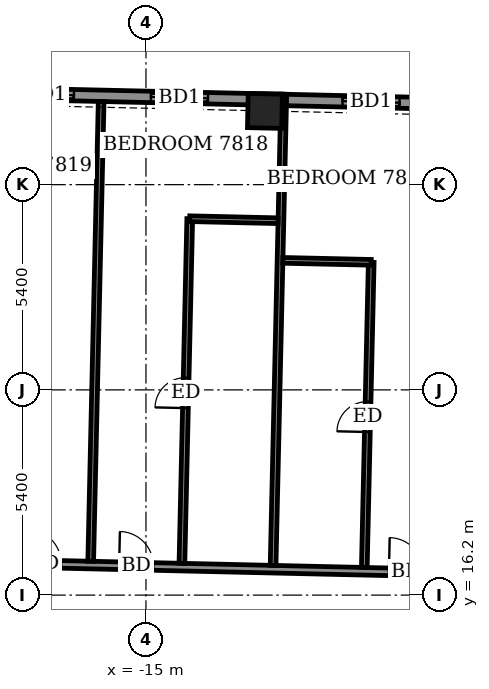
"""IFC4 building model, lengths in metres.
Left out: names, types, materials, properties, quantities, classifications, styles, units other than length and angle.
Written with IfcOpenShell. Run it as: python <this file> out.ifc"""

import sys

from ifc_helpers import new_model, si_unit, direction, frame, frame_2d, origin, origin_2d, place, context, subcontext, project, spatial, rectangle, extrude, element, fill, save


model = new_model("IFC4")
c1 = context("Model", 3, precision=1e-05, world=origin(), true_north=direction((0.0, 1.0)))
c2 = subcontext(c1, "Body", "Model", "MODEL_VIEW")
j1 = project(units=[si_unit("LENGTHUNIT", "METRE"), si_unit("PLANEANGLEUNIT", "RADIAN")], contexts=[c1])
p1 = place(None, origin())
s1 = spatial("IfcSite", under=j1, at=p1, CompositionType="ELEMENT")
p2 = place(p1, origin())
s2 = spatial("IfcBuilding", under=s1, at=p2, CompositionType="ELEMENT")
p3 = place(p2, frame((0.0, 0.0, 306.1)))
s3 = spatial("IfcBuildingStorey", under=s2, at=p3, CompositionType="ELEMENT", Elevation=306.1)
p4 = place(p3, frame((-11.869, 28.94, -0.55), z_axis=(0.0, 0.0, 1.0), x_axis=(-0.999743149141, 0.022663533403, 0.0)))
e1 = element("IfcColumn", 1, at=p4, inside=s3, PredefinedType="COLUMN", context=c2, shape_type="SweptSolid", body=[
    extrude(rectangle(XDim=0.9, YDim=0.9, at=origin_2d()), origin(), (0.0, 0.0, 1.0), 3.6),
])
p5 = place(p3, frame((25.264, 28.397, 0.0), z_axis=(0.0, 0.0, 1.0), x_axis=(-0.999742391375, 0.022696935658, 0.0)))
e2 = element("IfcWall", 2, at=p5, inside=s3, PredefinedType="SOLIDWALL", context=c2, shape_type="SweptSolid", body=[
    extrude(rectangle(XDim=51.9, YDim=0.3, at=frame_2d((25.95, 0.0))), origin(), (0.0, 0.0, 1.0), 2.5),
])
p6 = place(p5, frame((1.898, 0.0, 0.0)))
e3 = element("IfcOpeningElement", 3, at=p6, cuts=e2, PredefinedType="OPENING", context=c2, shape_type="SweptSolid", body=[
    extrude(rectangle(XDim=1.5, YDim=2.4, at=frame_2d((0.75, 1.2))), frame((0.0, 0.16, 0.0), z_axis=(0.0, -1.0, 0.0), x_axis=(1.0, 0.0, 0.0)), (0.0, 0.0, 1.0), 0.32),
])
p7 = place(p5, frame((5.229, 0.0, 0.0)))
e4 = element("IfcOpeningElement", 4, at=p7, cuts=e2, PredefinedType="OPENING", context=c2, shape_type="SweptSolid", body=[
    extrude(rectangle(XDim=1.5, YDim=2.4, at=frame_2d((0.75, 1.2))), frame((0.0, 0.16, 0.0), z_axis=(0.0, -1.0, 0.0), x_axis=(1.0, 0.0, 0.0)), (0.0, 0.0, 1.0), 0.32),
])
p8 = place(p5, frame((10.7, 0.0, 0.0)))
e5 = element("IfcOpeningElement", 5, at=p8, cuts=e2, PredefinedType="OPENING", context=c2, shape_type="SweptSolid", body=[
    extrude(rectangle(XDim=1.5, YDim=2.4, at=frame_2d((0.75, 1.2))), frame((0.0, 0.16, 0.0), z_axis=(0.0, -1.0, 0.0), x_axis=(1.0, 0.0, 0.0)), (0.0, 0.0, 1.0), 0.32),
])
p9 = place(p5, frame((15.832, 0.0, 0.0)))
e6 = element("IfcOpeningElement", 6, at=p9, cuts=e2, PredefinedType="OPENING", context=c2, shape_type="SweptSolid", body=[
    extrude(rectangle(XDim=1.5, YDim=2.4, at=frame_2d((0.75, 1.2))), frame((0.0, 0.16, 0.0), z_axis=(0.0, -1.0, 0.0), x_axis=(1.0, 0.0, 0.0)), (0.0, 0.0, 1.0), 0.32),
])
p10 = place(p5, frame((19.361, 0.0, 0.0)))
e7 = element("IfcOpeningElement", 7, at=p10, cuts=e2, PredefinedType="OPENING", context=c2, shape_type="SweptSolid", body=[
    extrude(rectangle(XDim=1.5, YDim=2.4, at=frame_2d((0.75, 1.2))), frame((0.0, 0.16, 0.0), z_axis=(0.0, -1.0, 0.0), x_axis=(1.0, 0.0, 0.0)), (0.0, 0.0, 1.0), 0.32),
])
p11 = place(p5, frame((24.1, 0.0, 0.0)))
e8 = element("IfcOpeningElement", 8, at=p11, cuts=e2, PredefinedType="OPENING", context=c2, shape_type="SweptSolid", body=[
    extrude(rectangle(XDim=1.5, YDim=2.4, at=frame_2d((0.75, 1.2))), frame((0.0, 0.16, 0.0), z_axis=(0.0, -1.0, 0.0), x_axis=(1.0, 0.0, 0.0)), (0.0, 0.0, 1.0), 0.32),
])
p12 = place(p5, frame((27.539, 0.0, 0.0)))
e9 = element("IfcOpeningElement", 9, at=p12, cuts=e2, PredefinedType="OPENING", context=c2, shape_type="SweptSolid", body=[
    extrude(rectangle(XDim=1.5, YDim=2.4, at=frame_2d((0.75, 1.2))), frame((0.0, 0.16, 0.0), z_axis=(0.0, -1.0, 0.0), x_axis=(1.0, 0.0, 0.0)), (0.0, 0.0, 1.0), 0.32),
])
p13 = place(p5, frame((33.6, 0.0, 0.0)))
e10 = element("IfcOpeningElement", 10, at=p13, cuts=e2, PredefinedType="OPENING", context=c2, shape_type="SweptSolid", body=[
    extrude(rectangle(XDim=1.5, YDim=2.4, at=frame_2d((0.75, 1.2))), frame((0.0, 0.16, 0.0), z_axis=(0.0, -1.0, 0.0), x_axis=(1.0, 0.0, 0.0)), (0.0, 0.0, 1.0), 0.32),
])
p14 = place(p5, frame((38.643, 0.0, 0.0)))
e11 = element("IfcOpeningElement", 11, at=p14, cuts=e2, PredefinedType="OPENING", context=c2, shape_type="SweptSolid", body=[
    extrude(rectangle(XDim=1.5, YDim=2.4, at=frame_2d((0.75, 1.2))), frame((0.0, 0.16, 0.0), z_axis=(0.0, -1.0, 0.0), x_axis=(1.0, 0.0, 0.0)), (0.0, 0.0, 1.0), 0.32),
])
p15 = place(p5, frame((42.171, 0.0, 0.0)))
e12 = element("IfcOpeningElement", 12, at=p15, cuts=e2, PredefinedType="OPENING", context=c2, shape_type="SweptSolid", body=[
    extrude(rectangle(XDim=1.5, YDim=2.4, at=frame_2d((0.75, 1.2))), frame((0.0, 0.16, 0.0), z_axis=(0.0, -1.0, 0.0), x_axis=(1.0, 0.0, 0.0)), (0.0, 0.0, 1.0), 0.32),
])
p16 = place(p5, frame((47.637, 0.0, 0.9)))
e13 = element("IfcOpeningElement", 13, at=p16, cuts=e2, PredefinedType="OPENING", context=c2, shape_type="SweptSolid", body=[
    extrude(rectangle(XDim=2.4, YDim=1.5, at=frame_2d((1.2, 0.75))), frame((0.0, 0.16, 0.0), z_axis=(0.0, -1.0, 0.0), x_axis=(1.0, 0.0, 0.0)), (0.0, 0.0, 1.0), 0.32),
])
p17 = place(p3, frame((-30.652, 17.313, 0.0), z_axis=(0.0, 0.0, 1.0), x_axis=(0.999742623764, -0.02268669719, 0.0)))
e14 = element("IfcWall", 14, at=p17, inside=s3, PredefinedType="PARTITIONING", context=c2, shape_type="SweptSolid", body=[
    extrude(rectangle(XDim=58.8, YDim=0.2, at=frame_2d((29.4, 0.0))), origin(), (0.0, 0.0, 1.0), 3.05),
])
p18 = place(p17, frame((54.601, 0.0, 0.0)))
e15 = element("IfcOpeningElement", 15, at=p18, cuts=e14, PredefinedType="OPENING", context=c2, shape_type="SweptSolid", body=[
    extrude(rectangle(XDim=1.0, YDim=2.1, at=frame_2d((0.5, 1.05))), frame((0.0, 0.11, 0.0), z_axis=(0.0, -1.0, 0.0), x_axis=(1.0, 0.0, 0.0)), (0.0, 0.0, 1.0), 0.22),
])
p19 = place(p17, frame((49.35, 0.0, 0.0)))
e16 = element("IfcOpeningElement", 16, at=p19, cuts=e14, PredefinedType="OPENING", context=c2, shape_type="SweptSolid", body=[
    extrude(rectangle(XDim=0.9, YDim=2.1, at=frame_2d((0.45, 1.05))), frame((0.0, 0.11, 0.0), z_axis=(0.0, -1.0, 0.0), x_axis=(1.0, 0.0, 0.0)), (0.0, 0.0, 1.0), 0.22),
])
p20 = place(p17, frame((42.55, 0.0, 0.0)))
e17 = element("IfcOpeningElement", 17, at=p20, cuts=e14, PredefinedType="OPENING", context=c2, shape_type="SweptSolid", body=[
    extrude(rectangle(XDim=0.9, YDim=2.1, at=frame_2d((0.45, 1.05))), frame((0.0, 0.11, 0.0), z_axis=(0.0, -1.0, 0.0), x_axis=(1.0, 0.0, 0.0)), (0.0, 0.0, 1.0), 0.22),
])
p21 = place(p17, frame((40.475, 0.0, 0.0)))
e18 = element("IfcOpeningElement", 18, at=p21, cuts=e14, PredefinedType="OPENING", context=c2, shape_type="SweptSolid", body=[
    extrude(rectangle(XDim=0.9, YDim=2.1, at=frame_2d((0.45, 1.05))), frame((0.0, 0.11, 0.0), z_axis=(0.0, -1.0, 0.0), x_axis=(1.0, 0.0, 0.0)), (0.0, 0.0, 1.0), 0.22),
])
p22 = place(p17, frame((33.6, 0.0, 0.0)))
e19 = element("IfcOpeningElement", 19, at=p22, cuts=e14, PredefinedType="OPENING", context=c2, shape_type="SweptSolid", body=[
    extrude(rectangle(XDim=0.9, YDim=2.1, at=frame_2d((0.45, 1.05))), frame((0.0, 0.11, 0.0), z_axis=(0.0, -1.0, 0.0), x_axis=(1.0, 0.0, 0.0)), (0.0, 0.0, 1.0), 0.22),
])
p23 = place(p17, frame((31.55, 0.0, 0.0)))
e20 = element("IfcOpeningElement", 20, at=p23, cuts=e14, PredefinedType="OPENING", context=c2, shape_type="SweptSolid", body=[
    extrude(rectangle(XDim=0.9, YDim=2.1, at=frame_2d((0.45, 1.05))), frame((0.0, 0.11, 0.0), z_axis=(0.0, -1.0, 0.0), x_axis=(1.0, 0.0, 0.0)), (0.0, 0.0, 1.0), 0.22),
])
p24 = place(p17, frame((24.425, 0.0, 0.0)))
e21 = element("IfcOpeningElement", 21, at=p24, cuts=e14, PredefinedType="OPENING", context=c2, shape_type="SweptSolid", body=[
    extrude(rectangle(XDim=0.9, YDim=2.1, at=frame_2d((0.45, 1.05))), frame((0.0, 0.11, 0.0), z_axis=(0.0, -1.0, 0.0), x_axis=(1.0, 0.0, 0.0)), (0.0, 0.0, 1.0), 0.22),
])
p25 = place(p17, frame((22.05, 0.0, 0.0)))
e22 = element("IfcOpeningElement", 22, at=p25, cuts=e14, PredefinedType="OPENING", context=c2, shape_type="SweptSolid", body=[
    extrude(rectangle(XDim=0.9, YDim=2.1, at=frame_2d((0.45, 1.05))), frame((0.0, 0.11, 0.0), z_axis=(0.0, -1.0, 0.0), x_axis=(1.0, 0.0, 0.0)), (0.0, 0.0, 1.0), 0.22),
])
p26 = place(p17, frame((14.95, 0.0, 0.0)))
e23 = element("IfcOpeningElement", 23, at=p26, cuts=e14, PredefinedType="OPENING", context=c2, shape_type="SweptSolid", body=[
    extrude(rectangle(XDim=0.9, YDim=2.1, at=frame_2d((0.45, 1.05))), frame((0.0, 0.11, 0.0), z_axis=(0.0, -1.0, 0.0), x_axis=(1.0, 0.0, 0.0)), (0.0, 0.0, 1.0), 0.22),
])
p27 = place(p17, frame((12.525, 0.0, 0.0)))
e24 = element("IfcOpeningElement", 24, at=p27, cuts=e14, PredefinedType="OPENING", context=c2, shape_type="SweptSolid", body=[
    extrude(rectangle(XDim=0.9, YDim=2.1, at=frame_2d((0.45, 1.05))), frame((0.0, 0.11, 0.0), z_axis=(0.0, -1.0, 0.0), x_axis=(1.0, 0.0, 0.0)), (0.0, 0.0, 1.0), 0.22),
])
p28 = place(p17, frame((4.032, 0.0, 0.0)))
e25 = element("IfcOpeningElement", 25, at=p28, cuts=e14, PredefinedType="OPENING", context=c2, shape_type="SweptSolid", body=[
    extrude(rectangle(XDim=1.0, YDim=2.1, at=frame_2d((0.5, 1.05))), frame((0.0, 0.11, 0.0), z_axis=(0.0, -1.0, 0.0), x_axis=(1.0, 0.0, 0.0)), (0.0, 0.0, 1.0), 0.22),
])
p29 = place(p3, frame((-16.454, 17.091, 0.0), z_axis=(0.0, 0.0, 1.0), x_axis=(0.02273928012, 0.99974142914, 0.0)))
e26 = element("IfcWall", 26, at=p29, inside=s3, PredefinedType="PARTITIONING", context=c2, shape_type="SweptSolid", body=[
    extrude(rectangle(XDim=12.1, YDim=0.15, at=frame_2d((6.05, 0.0))), origin(), (0.0, 0.0, 1.0), 2.5),
])
p30 = place(p3, frame((-14.054, 17.037, 0.0), z_axis=(0.0, 0.0, 1.0), x_axis=(0.022720182365, 0.999741863339, 0.0)))
e27 = element("IfcWall", 27, at=p30, inside=s3, PredefinedType="PARTITIONING", context=c2, shape_type="SweptSolid", body=[
    extrude(rectangle(XDim=9.069, YDim=0.15, at=frame_2d((4.535, 0.0))), origin(), (0.0, 0.0, 1.0), 3.05),
])
p31 = place(p30, frame((4.085, 0.0, 0.0)))
e28 = element("IfcOpeningElement", 28, at=p31, cuts=e27, PredefinedType="OPENING", context=c2, shape_type="SweptSolid", body=[
    extrude(rectangle(XDim=0.8, YDim=2.1, at=frame_2d((0.4, 1.05))), frame((0.0, 0.085, 0.0), z_axis=(0.0, -1.0, 0.0), x_axis=(1.0, 0.0, 0.0)), (0.0, 0.0, 1.0), 0.17),
])
p32 = place(p3, frame((-11.655, 16.982, 0.0), z_axis=(0.0, 0.0, 1.0), x_axis=(0.022740189192, 0.999741408463, 0.0)))
e29 = element("IfcWall", 29, at=p32, inside=s3, PredefinedType="PARTITIONING", context=c2, shape_type="SweptSolid", body=[
    extrude(rectangle(XDim=12.4, YDim=0.15, at=frame_2d((6.2, 0.0))), origin(), (0.0, 0.0, 1.0), 2.5),
])
p33 = place(p3, frame((-9.255, 16.928, 0.0), z_axis=(0.0, 0.0, 1.0), x_axis=(0.022650271266, 0.999743449697, 0.0)))
e30 = element("IfcWall", 30, at=p33, inside=s3, PredefinedType="PARTITIONING", context=c2, shape_type="SweptSolid", body=[
    extrude(rectangle(XDim=8.03, YDim=0.15, at=frame_2d((4.015, 0.0))), origin(), (0.0, 0.0, 1.0), 3.05),
])
p34 = place(p33, frame((3.565, 0.0, 0.0)))
e31 = element("IfcOpeningElement", 31, at=p34, cuts=e30, PredefinedType="OPENING", context=c2, shape_type="SweptSolid", body=[
    extrude(rectangle(XDim=0.8, YDim=2.1, at=frame_2d((0.4, 1.05))), frame((0.0, 0.085, 0.0), z_axis=(0.0, -1.0, 0.0), x_axis=(1.0, 0.0, 0.0)), (0.0, 0.0, 1.0), 0.17),
])
p35 = place(p3, frame((-11.398, 25.008, 0.0), z_axis=(0.0, 0.0, 1.0), x_axis=(0.999749954681, -0.022361308448, 0.0)))
e32 = element("IfcWall", 32, at=p35, inside=s3, PredefinedType="PARTITIONING", context=c2, shape_type="SweptSolid", body=[
    extrude(rectangle(XDim=2.325, YDim=0.15, at=frame_2d((1.163, 0.0))), origin(), (0.0, 0.0, 1.0), 3.05),
])
p36 = place(p3, frame((-13.848, 26.104, 0.0), z_axis=(0.0, 0.0, 1.0), x_axis=(0.999740260747, -0.02279059109, 0.0)))
e33 = element("IfcWall", 33, at=p36, inside=s3, PredefinedType="PARTITIONING", context=c2, shape_type="SweptSolid", body=[
    extrude(rectangle(XDim=2.324, YDim=0.15, at=frame_2d((1.162, 0.0))), origin(), (0.0, 0.0, 1.0), 3.05),
])
p37 = place(p13, origin())
e34 = element("IfcDoor", 34, at=p37, inside=s3, OperationType="SLIDING_TO_LEFT", PredefinedType="DOOR", context=c2, shape_type="SweptSolid", body=[
    extrude(rectangle(XDim=1.5, YDim=2.4, at=frame_2d((0.75, 1.2))), frame((0.0, 0.025, 0.0), z_axis=(0.0, -1.0, 0.0), x_axis=(1.0, 0.0, 0.0)), (0.0, 0.0, 1.0), 0.05),
])
fill(e10, e34)
p38 = place(p14, origin())
e35 = element("IfcDoor", 35, at=p38, inside=s3, OperationType="SLIDING_TO_LEFT", PredefinedType="DOOR", context=c2, shape_type="SweptSolid", body=[
    extrude(rectangle(XDim=1.5, YDim=2.4, at=frame_2d((0.75, 1.2))), frame((0.0, 0.025, 0.0), z_axis=(0.0, -1.0, 0.0), x_axis=(1.0, 0.0, 0.0)), (0.0, 0.0, 1.0), 0.05),
])
fill(e11, e35)
p39 = place(p15, origin())
e36 = element("IfcDoor", 36, at=p39, inside=s3, OperationType="SLIDING_TO_LEFT", PredefinedType="DOOR", context=c2, shape_type="SweptSolid", body=[
    extrude(rectangle(XDim=1.5, YDim=2.4, at=frame_2d((0.75, 1.2))), frame((0.0, 0.025, 0.0), z_axis=(0.0, -1.0, 0.0), x_axis=(1.0, 0.0, 0.0)), (0.0, 0.0, 1.0), 0.05),
])
fill(e12, e36)
p40 = place(p25, origin())
e37 = element("IfcDoor", 37, at=p40, inside=s3, OperationType="SINGLE_SWING_LEFT", PredefinedType="DOOR", context=c2, shape_type="SweptSolid", body=[
    extrude(rectangle(XDim=0.9, YDim=2.1, at=frame_2d((0.45, 1.05))), frame((0.0, 0.025, 0.0), z_axis=(0.0, -1.0, 0.0), x_axis=(1.0, 0.0, 0.0)), (0.0, 0.0, 1.0), 0.05),
])
fill(e22, e37)
p41 = place(p34, origin())
e38 = element("IfcDoor", 38, at=p41, inside=s3, OperationType="SINGLE_SWING_LEFT", PredefinedType="DOOR", context=c2, shape_type="SweptSolid", body=[
    extrude(rectangle(XDim=0.8, YDim=2.1, at=frame_2d((0.4, 1.05))), frame((0.0, 0.025, 0.0), z_axis=(0.0, -1.0, 0.0), x_axis=(1.0, 0.0, 0.0)), (0.0, 0.0, 1.0), 0.05),
])
fill(e31, e38)
p42 = place(p26, origin())
e39 = element("IfcDoor", 39, at=p42, inside=s3, OperationType="SINGLE_SWING_RIGHT", PredefinedType="DOOR", context=c2, shape_type="SweptSolid", body=[
    extrude(rectangle(XDim=0.9, YDim=2.1, at=frame_2d((0.45, 1.05))), frame((0.0, 0.025, 0.0), z_axis=(0.0, -1.0, 0.0), x_axis=(1.0, 0.0, 0.0)), (0.0, 0.0, 1.0), 0.05),
])
fill(e23, e39)
p43 = place(p31, origin())
e40 = element("IfcDoor", 40, at=p43, inside=s3, OperationType="SINGLE_SWING_RIGHT", PredefinedType="DOOR", context=c2, shape_type="SweptSolid", body=[
    extrude(rectangle(XDim=0.8, YDim=2.1, at=frame_2d((0.4, 1.05))), frame((0.0, 0.025, 0.0), z_axis=(0.0, -1.0, 0.0), x_axis=(1.0, 0.0, 0.0)), (0.0, 0.0, 1.0), 0.05),
])
fill(e28, e40)
p44 = place(p27, origin())
e41 = element("IfcDoor", 41, at=p44, inside=s3, OperationType="SINGLE_SWING_LEFT", PredefinedType="DOOR", context=c2, shape_type="SweptSolid", body=[
    extrude(rectangle(XDim=0.9, YDim=2.1, at=frame_2d((0.45, 1.05))), frame((0.0, 0.025, 0.0), z_axis=(0.0, -1.0, 0.0), x_axis=(1.0, 0.0, 0.0)), (0.0, 0.0, 1.0), 0.05),
])
fill(e24, e41)
save(model, sys.argv[1])
